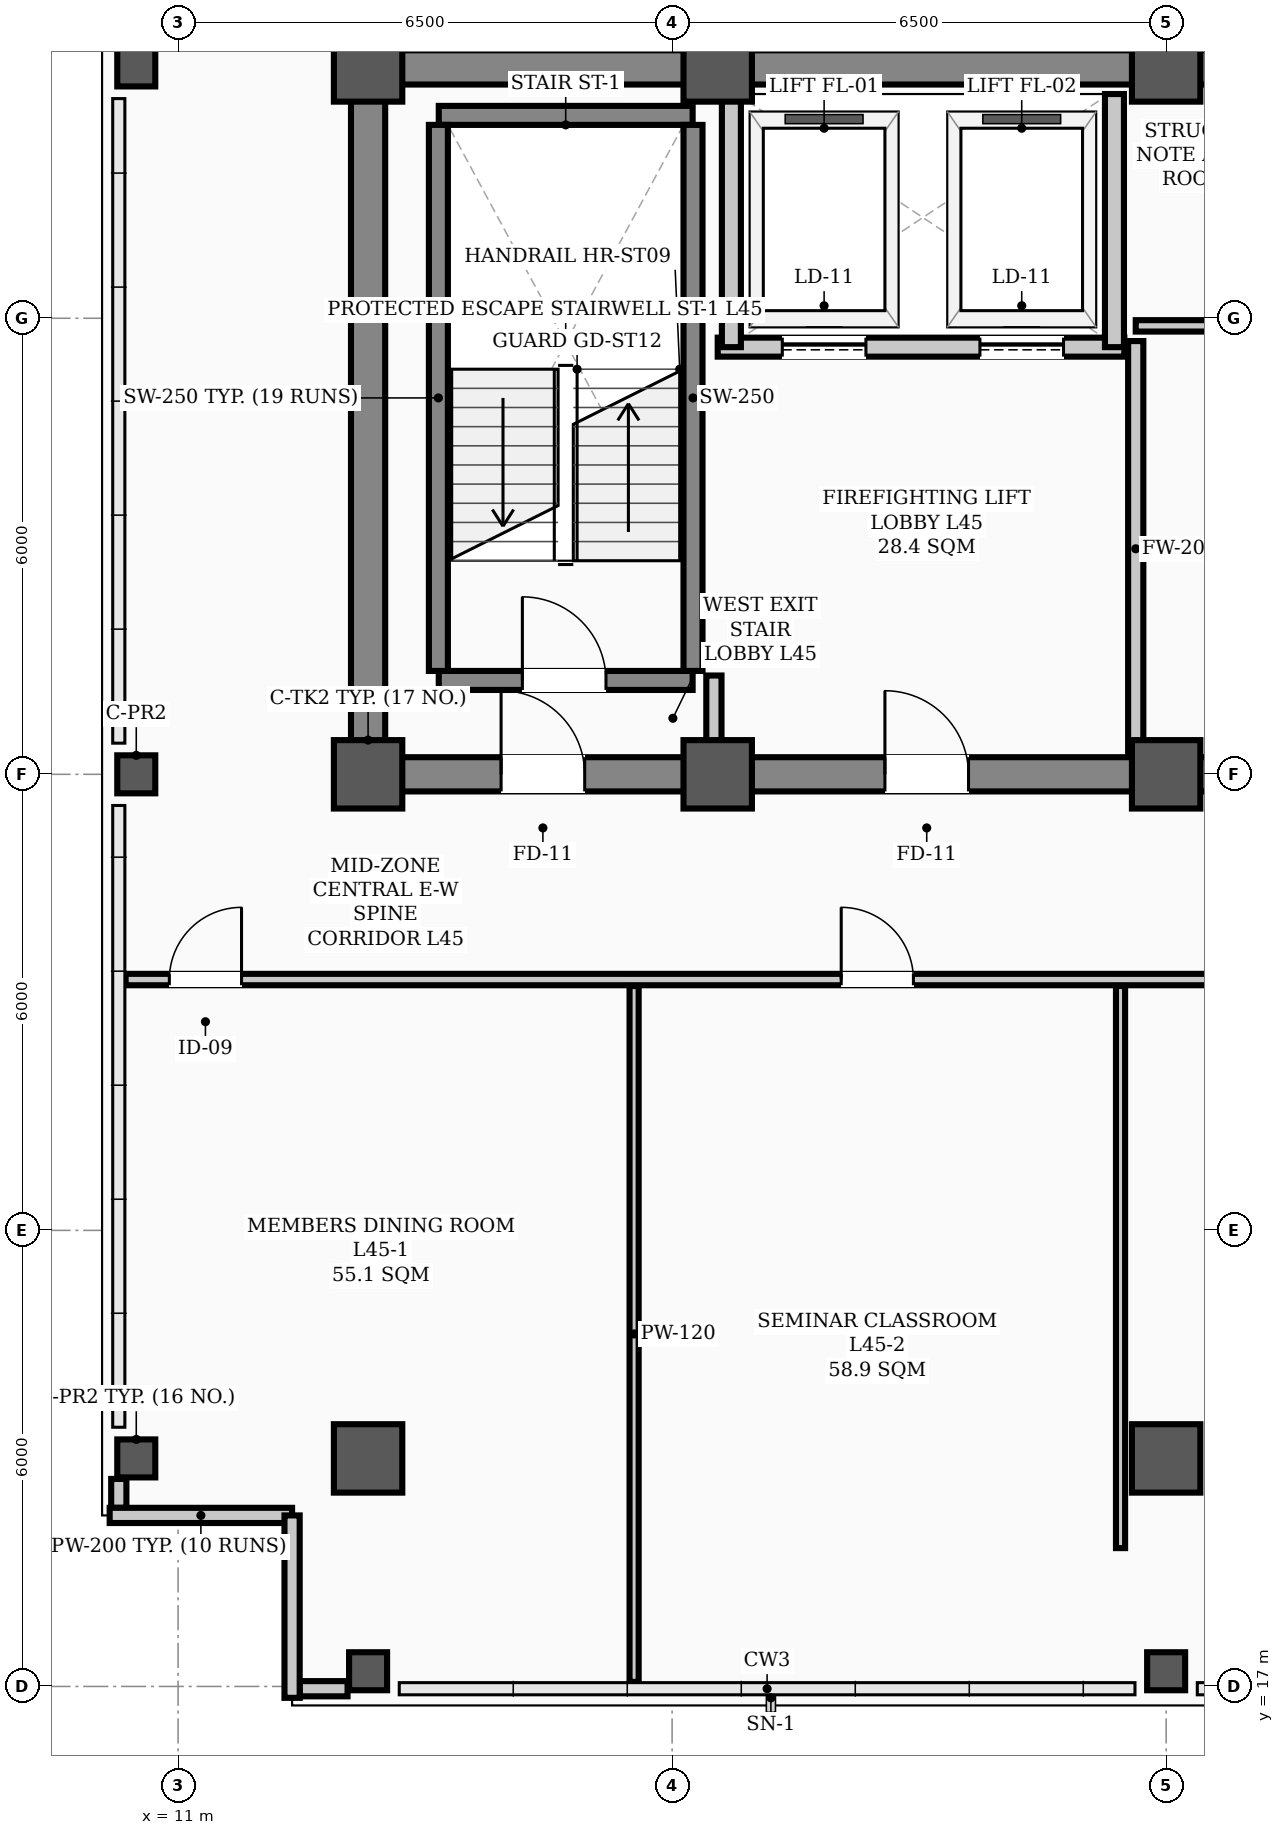
"""IFC4 building model, lengths in metres.
Left out: names, types, materials, properties, quantities, classifications, styles, units other than length and angle.
Written with IfcOpenShell. Run it as: python <this file> out.ifc"""

import sys

from ifc_helpers import new_model, si_unit, direction, frame, frame_2d, origin, origin_2d, place, context, subcontext, project, spatial, rectangle, hollow_rectangle, extrude, element, fill, save


model = new_model("IFC4")
c1 = context("Model", 3, precision=1e-05, world=origin(), true_north=direction((0.0, 1.0)))
c2 = subcontext(c1, "Body", "Model", "MODEL_VIEW")
j1 = project(units=[si_unit("LENGTHUNIT", "METRE"), si_unit("PLANEANGLEUNIT", "RADIAN")], contexts=[c1])
p1 = place(None, origin())
s1 = spatial("IfcSite", under=j1, at=p1, CompositionType="ELEMENT")
p2 = place(p1, origin())
s2 = spatial("IfcBuilding", under=s1, at=p2, CompositionType="ELEMENT")
p3 = place(p2, frame((0.0, 0.0, 181.2)))
s3 = spatial("IfcBuildingStorey", under=s2, at=p3, CompositionType="ELEMENT", Elevation=181.2)
for number, where, z_axis, x_axis in (
    (1, (13.5, 29.0, 0.0), (0.0, 0.0, 1.0), (1.0, 0.0, 0.0)),
    (2, (13.5, 38.3, 0.0), (0.0, 0.0, 1.0), (1.0, 0.0, 0.0)),
    (3, (18.1, 29.0, 0.0), (0.0, 0.0, 1.0), (1.0, 0.0, 0.0)),
    (4, (18.1, 38.3, 0.0), (0.0, 0.0, 1.0), (1.0, 0.0, 0.0)),
    (5, (24.0, 29.0, 0.0), (0.0, 0.0, 1.0), (1.0, 0.0, 0.0)),
    (6, (24.0, 38.3, 0.0), (0.0, 0.0, 1.0), (1.0, 0.0, 0.0)),
    (7, (13.5, 20.0, 0.0), (0.0, 0.0, 1.0), (1.0, 0.0, 0.0)),
    (8, (24.0, 20.0, 0.0), (0.0, 0.0, 1.0), (1.0, 0.0, 0.0)),
):
    element("IfcColumn", number, at=place(p3, frame(where, z_axis=z_axis, x_axis=x_axis)), inside=s3, PredefinedType="COLUMN", context=c2, shape_type="SweptSolid", body=[
        extrude(hollow_rectangle(XDim=0.9, YDim=0.9, WallThickness=0.035, InnerFilletRadius=0.017, OuterFilletRadius=0.052, at=origin_2d()), origin(), (0.0, 0.0, 1.0), 3.9),
    ])
for number, where, z_axis, x_axis in (
    (9, (10.45, 20.0, 0.0), (0.0, 0.0, 1.0), (1.0, 0.0, 0.0)),
    (10, (10.45, 29.0, 0.0), (0.0, 0.0, 1.0), (1.0, 0.0, 0.0)),
    (11, (10.45, 38.3, 0.0), (0.0, 0.0, 1.0), (1.0, 0.0, 0.0)),
    (12, (13.5, 17.2, 0.0), (0.0, 0.0, 1.0), (1.0, 0.0, 0.0)),
    (13, (24.0, 17.2, 0.0), (0.0, 0.0, 1.0), (1.0, 0.0, 0.0)),
):
    element("IfcColumn", number, at=place(p3, frame(where, z_axis=z_axis, x_axis=x_axis)), inside=s3, PredefinedType="COLUMN", context=c2, shape_type="SweptSolid", body=[
        extrude(hollow_rectangle(XDim=0.5, YDim=0.5, WallThickness=0.024, InnerFilletRadius=0.012, OuterFilletRadius=0.036, at=origin_2d()), origin(), (0.0, 0.0, 1.0), 3.9),
    ])
p4 = place(p3, frame((10.22, 19.35, 0.0), z_axis=(0.0, 0.0, 1.0), x_axis=(0.0, 1.0, 0.0)))
e14 = element("IfcWall", 14, at=p4, inside=s3, PredefinedType="PARAPET", context=c2, shape_type="SweptSolid", body=[
    extrude(rectangle(XDim=0.38, YDim=0.2, at=frame_2d((0.19, 0.0))), origin(), (0.0, 0.0, 1.0), 1.2),
])
p5 = place(p3, frame((12.6, 16.97, 0.0), z_axis=(0.0, 0.0, 1.0), x_axis=(1.0, 0.0, 0.0)))
e15 = element("IfcWall", 15, at=p5, inside=s3, PredefinedType="PARAPET", context=c2, shape_type="SweptSolid", body=[
    extrude(rectangle(XDim=0.63, YDim=0.2, at=frame_2d((0.315, 0.0))), origin(), (0.0, 0.0, 1.0), 1.2),
])
for number, where, z_axis, x_axis in (
    (16, (10.1, 19.25, 0.0), (0.0, 0.0, 1.0), (1.0, 0.0, 0.0)),
    (17, (12.5, 19.25, 0.0), (0.0, 0.0, 1.0), (0.0, -1.0, 0.0)),
):
    element("IfcWall", number, at=place(p3, frame(where, z_axis=z_axis, x_axis=x_axis)), inside=s3, PredefinedType="PARAPET", context=c2, shape_type="SweptSolid", body=[
        extrude(rectangle(XDim=2.4, YDim=0.2, at=frame_2d((1.2, 0.0))), origin(), (0.0, 0.0, 1.0), 1.2),
    ])
p6 = place(p3, frame((13.5, 29.0, 0.0), z_axis=(0.0, 0.0, 1.0), x_axis=(1.0, 0.0, 0.0)))
e18 = element("IfcWall", 18, at=p6, inside=s3, PredefinedType="SHEAR", context=c2, shape_type="SweptSolid", body=[
    extrude(rectangle(XDim=30.5, YDim=0.45, at=frame_2d((15.25, 0.0))), origin(), (0.0, 0.0, 1.0), 3.72),
])
p7 = place(p6, frame((1.75, 0.0, 0.0)))
e19 = element("IfcOpeningElement", 19, at=p7, cuts=e18, PredefinedType="OPENING", context=c2, shape_type="SweptSolid", body=[
    extrude(rectangle(XDim=1.1, YDim=2.08, at=frame_2d((0.55, 1.04))), frame((0.0, 0.235, 0.0), z_axis=(0.0, -1.0, 0.0), x_axis=(1.0, 0.0, 0.0)), (0.0, 0.0, 1.0), 0.47),
])
p8 = place(p6, frame((26.7, 0.0, 0.0)))
e20 = element("IfcOpeningElement", 20, at=p8, cuts=e18, PredefinedType="OPENING", context=c2, shape_type="SweptSolid", body=[
    extrude(rectangle(XDim=1.1, YDim=2.08, at=frame_2d((0.55, 1.04))), frame((0.0, 0.235, 0.0), z_axis=(0.0, -1.0, 0.0), x_axis=(1.0, 0.0, 0.0)), (0.0, 0.0, 1.0), 0.47),
])
p9 = place(p6, frame((6.8, 0.0, 0.0)))
e21 = element("IfcOpeningElement", 21, at=p9, cuts=e18, PredefinedType="OPENING", context=c2, shape_type="SweptSolid", body=[
    extrude(rectangle(XDim=1.1, YDim=2.08, at=frame_2d((0.55, 1.04))), frame((0.0, 0.235, 0.0), z_axis=(0.0, -1.0, 0.0), x_axis=(1.0, 0.0, 0.0)), (0.0, 0.0, 1.0), 0.47),
])
p10 = place(p6, frame((13.2, 0.0, 0.0)))
e22 = element("IfcOpeningElement", 22, at=p10, cuts=e18, PredefinedType="OPENING", context=c2, shape_type="SweptSolid", body=[
    extrude(rectangle(XDim=1.6, YDim=2.08, at=frame_2d((0.8, 1.04))), frame((0.0, 0.235, 0.0), z_axis=(0.0, -1.0, 0.0), x_axis=(1.0, 0.0, 0.0)), (0.0, 0.0, 1.0), 0.47),
])
p11 = place(p6, frame((19.5, 0.0, 0.0)))
e23 = element("IfcOpeningElement", 23, at=p11, cuts=e18, PredefinedType="OPENING", context=c2, shape_type="SweptSolid", body=[
    extrude(rectangle(XDim=0.9, YDim=2.08, at=frame_2d((0.45, 1.04))), frame((0.0, 0.235, 0.0), z_axis=(0.0, -1.0, 0.0), x_axis=(1.0, 0.0, 0.0)), (0.0, 0.0, 1.0), 0.47),
])
p12 = place(p6, frame((21.55, 0.0, 0.0)))
e24 = element("IfcOpeningElement", 24, at=p12, cuts=e18, PredefinedType="OPENING", context=c2, shape_type="SweptSolid", body=[
    extrude(rectangle(XDim=0.9, YDim=2.08, at=frame_2d((0.45, 1.04))), frame((0.0, 0.235, 0.0), z_axis=(0.0, -1.0, 0.0), x_axis=(1.0, 0.0, 0.0)), (0.0, 0.0, 1.0), 0.47),
])
p13 = place(p3, frame((13.5, 38.3, 0.0), z_axis=(0.0, 0.0, 1.0), x_axis=(1.0, 0.0, 0.0)))
e25 = element("IfcWall", 25, at=p13, inside=s3, PredefinedType="SHEAR", context=c2, shape_type="SweptSolid", body=[
    extrude(rectangle(XDim=30.5, YDim=0.45, at=frame_2d((15.25, 0.0))), origin(), (0.0, 0.0, 1.0), 3.72),
])
p14 = place(p3, frame((13.5, 29.35, 0.0), z_axis=(0.0, 0.0, 1.0), x_axis=(0.0, 1.0, 0.0)))
e26 = element("IfcWall", 26, at=p14, inside=s3, PredefinedType="SHEAR", context=c2, shape_type="SweptSolid", body=[
    extrude(rectangle(XDim=8.6, YDim=0.45, at=frame_2d((4.3, 0.0))), origin(), (0.0, 0.0, 1.0), 3.72),
])
p15 = place(p3, frame((14.43, 30.235, 0.0), z_axis=(0.0, 0.0, 1.0), x_axis=(1.0, 0.0, 0.0)))
e27 = element("IfcWall", 27, at=p15, inside=s3, PredefinedType="STANDARD", context=c2, shape_type="SweptSolid", body=[
    extrude(rectangle(XDim=3.34, YDim=0.25, at=frame_2d((1.67, 0.0))), origin(), (0.0, 0.0, 1.0), 3.72),
])
p16 = place(p15, frame((1.1, 0.0, 0.0)))
e28 = element("IfcOpeningElement", 28, at=p16, cuts=e27, PredefinedType="OPENING", context=c2, shape_type="SweptSolid", body=[
    extrude(rectangle(XDim=1.1, YDim=2.08, at=frame_2d((0.55, 1.04))), frame((0.0, 0.135, 0.0), z_axis=(0.0, -1.0, 0.0), x_axis=(1.0, 0.0, 0.0)), (0.0, 0.0, 1.0), 0.27),
])
p17 = place(p3, frame((14.43, 37.669, 0.0), z_axis=(0.0, 0.0, 1.0), x_axis=(1.0, 0.0, 0.0)))
e29 = element("IfcWall", 29, at=p17, inside=s3, PredefinedType="STANDARD", context=c2, shape_type="SweptSolid", body=[
    extrude(rectangle(XDim=3.34, YDim=0.25, at=frame_2d((1.67, 0.0))), origin(), (0.0, 0.0, 1.0), 3.72),
])
for number, where, z_axis, x_axis in (
    (30, (14.425, 30.36, 0.0), (0.0, 0.0, 1.0), (0.0, 1.0, 0.0)),
    (31, (17.775, 30.36, 0.0), (0.0, 0.0, 1.0), (0.0, 1.0, 0.0)),
):
    element("IfcWall", number, at=place(p3, frame(where, z_axis=z_axis, x_axis=x_axis)), inside=s3, PredefinedType="STANDARD", context=c2, shape_type="SweptSolid", body=[
        extrude(rectangle(XDim=7.184, YDim=0.25, at=frame_2d((3.592, 0.0))), origin(), (0.0, 0.0, 1.0), 3.72),
    ])
p18 = place(p3, frame((18.1, 34.62, 0.0), z_axis=(0.0, 0.0, 1.0), x_axis=(1.0, 0.0, 0.0)))
e32 = element("IfcWall", 32, at=p18, inside=s3, PredefinedType="STANDARD", context=c2, shape_type="SweptSolid", body=[
    extrude(rectangle(XDim=5.35, YDim=0.25, at=frame_2d((2.675, 0.0))), origin(), (0.0, 0.0, 1.0), 3.72),
])
p19 = place(p18, frame((0.85, 0.0, 0.0)))
e33 = element("IfcOpeningElement", 33, at=p19, cuts=e32, PredefinedType="OPENING", context=c2, shape_type="SweptSolid", body=[
    extrude(rectangle(XDim=1.1, YDim=2.08, at=frame_2d((0.55, 1.04))), frame((0.0, 0.135, 0.0), z_axis=(0.0, -1.0, 0.0), x_axis=(1.0, 0.0, 0.0)), (0.0, 0.0, 1.0), 0.27),
])
p20 = place(p18, frame((3.45, 0.0, 0.0)))
e34 = element("IfcOpeningElement", 34, at=p20, cuts=e32, PredefinedType="OPENING", context=c2, shape_type="SweptSolid", body=[
    extrude(rectangle(XDim=1.1, YDim=2.08, at=frame_2d((0.55, 1.04))), frame((0.0, 0.135, 0.0), z_axis=(0.0, -1.0, 0.0), x_axis=(1.0, 0.0, 0.0)), (0.0, 0.0, 1.0), 0.27),
])
for number, where, z_axis, x_axis in (
    (35, (18.28, 34.62, 0.0), (0.0, 0.0, 1.0), (0.0, 1.0, 0.0)),
    (36, (23.32, 34.62, 0.0), (0.0, 0.0, 1.0), (0.0, 1.0, 0.0)),
):
    element("IfcWall", number, at=place(p3, frame(where, z_axis=z_axis, x_axis=x_axis)), inside=s3, PredefinedType="STANDARD", context=c2, shape_type="SweptSolid", body=[
        extrude(rectangle(XDim=3.33, YDim=0.25, at=frame_2d((1.665, 0.0))), origin(), (0.0, 0.0, 1.0), 3.35),
    ])
p21 = place(p3, frame((23.6, 34.9, 0.0), z_axis=(0.0, 0.0, 1.0), x_axis=(1.0, 0.0, 0.0)))
e37 = element("IfcWall", 37, at=p21, inside=s3, PredefinedType="PARTITIONING", context=c2, shape_type="SweptSolid", body=[
    extrude(rectangle(XDim=4.58, YDim=0.15, at=frame_2d((2.29, 0.0))), origin(), (0.0, 0.0, 1.0), 3.72),
])
p22 = place(p21, frame((1.875, 0.0, 0.0)))
e38 = element("IfcOpeningElement", 38, at=p22, cuts=e37, PredefinedType="OPENING", context=c2, shape_type="SweptSolid", body=[
    extrude(rectangle(XDim=0.95, YDim=2.08, at=frame_2d((0.475, 1.04))), frame((0.0, 0.085, 0.0), z_axis=(0.0, -1.0, 0.0), x_axis=(1.0, 0.0, 0.0)), (0.0, 0.0, 1.0), 0.17),
])
p23 = place(p3, frame((10.31, 26.3, 0.0), z_axis=(0.0, 0.0, 1.0), x_axis=(1.0, 0.0, 0.0)))
e39 = element("IfcWall", 39, at=p23, inside=s3, PredefinedType="PARTITIONING", context=c2, shape_type="SweptSolid", body=[
    extrude(rectangle(XDim=43.38, YDim=0.15, at=frame_2d((21.69, 0.0))), origin(), (0.0, 0.0, 1.0), 3.2),
])
p24 = place(p23, frame((0.575, 0.0, 0.0)))
e40 = element("IfcOpeningElement", 40, at=p24, cuts=e39, PredefinedType="OPENING", context=c2, shape_type="SweptSolid", body=[
    extrude(rectangle(XDim=0.95, YDim=2.08, at=frame_2d((0.475, 1.04))), frame((0.0, 0.085, 0.0), z_axis=(0.0, -1.0, 0.0), x_axis=(1.0, 0.0, 0.0)), (0.0, 0.0, 1.0), 0.17),
])
p25 = place(p23, frame((9.415, 0.0, 0.0)))
e41 = element("IfcOpeningElement", 41, at=p25, cuts=e39, PredefinedType="OPENING", context=c2, shape_type="SweptSolid", body=[
    extrude(rectangle(XDim=0.95, YDim=2.08, at=frame_2d((0.475, 1.04))), frame((0.0, 0.085, 0.0), z_axis=(0.0, -1.0, 0.0), x_axis=(1.0, 0.0, 0.0)), (0.0, 0.0, 1.0), 0.17),
])
p26 = place(p23, frame((16.115, 0.0, 0.0)))
e42 = element("IfcOpeningElement", 42, at=p26, cuts=e39, PredefinedType="OPENING", context=c2, shape_type="SweptSolid", body=[
    extrude(rectangle(XDim=0.95, YDim=2.08, at=frame_2d((0.475, 1.04))), frame((0.0, 0.085, 0.0), z_axis=(0.0, -1.0, 0.0), x_axis=(1.0, 0.0, 0.0)), (0.0, 0.0, 1.0), 0.17),
])
p27 = place(p23, frame((22.715, 0.0, 0.0)))
e43 = element("IfcOpeningElement", 43, at=p27, cuts=e39, PredefinedType="OPENING", context=c2, shape_type="SweptSolid", body=[
    extrude(rectangle(XDim=0.95, YDim=2.08, at=frame_2d((0.475, 1.04))), frame((0.0, 0.085, 0.0), z_axis=(0.0, -1.0, 0.0), x_axis=(1.0, 0.0, 0.0)), (0.0, 0.0, 1.0), 0.17),
])
p28 = place(p23, frame((29.015, 0.0, 0.0)))
e44 = element("IfcOpeningElement", 44, at=p28, cuts=e39, PredefinedType="OPENING", context=c2, shape_type="SweptSolid", body=[
    extrude(rectangle(XDim=0.95, YDim=2.08, at=frame_2d((0.475, 1.04))), frame((0.0, 0.085, 0.0), z_axis=(0.0, -1.0, 0.0), x_axis=(1.0, 0.0, 0.0)), (0.0, 0.0, 1.0), 0.17),
])
p29 = place(p23, frame((34.79, 0.0, 0.0)))
e45 = element("IfcOpeningElement", 45, at=p29, cuts=e39, PredefinedType="OPENING", context=c2, shape_type="SweptSolid", body=[
    extrude(rectangle(XDim=0.95, YDim=2.08, at=frame_2d((0.475, 1.04))), frame((0.0, 0.085, 0.0), z_axis=(0.0, -1.0, 0.0), x_axis=(1.0, 0.0, 0.0)), (0.0, 0.0, 1.0), 0.17),
])
p30 = place(p3, frame((18.05, 29.235, 0.0), z_axis=(0.0, 0.0, 1.0), x_axis=(0.0, 1.0, 0.0)))
e46 = element("IfcWall", 46, at=p30, inside=s3, PredefinedType="STANDARD", context=c2, shape_type="SweptSolid", body=[
    extrude(rectangle(XDim=1.065, YDim=0.2, at=frame_2d((0.532, 0.0))), origin(), (0.0, 0.0, 1.0), 3.35),
])
p31 = place(p3, frame((23.6, 29.235, 0.0), z_axis=(0.0, 0.0, 1.0), x_axis=(0.0, 1.0, 0.0)))
e47 = element("IfcWall", 47, at=p31, inside=s3, PredefinedType="STANDARD", context=c2, shape_type="SweptSolid", body=[
    extrude(rectangle(XDim=5.465, YDim=0.2, at=frame_2d((2.732, 0.0))), origin(), (0.0, 0.0, 1.0), 3.2),
])
p32 = place(p3, frame((17.0, 17.06, 0.0), z_axis=(0.0, 0.0, 1.0), x_axis=(0.0, 1.0, 0.0)))
e48 = element("IfcWall", 48, at=p32, inside=s3, PredefinedType="PARTITIONING", context=c2, shape_type="SweptSolid", body=[
    extrude(rectangle(XDim=9.155, YDim=0.12, at=frame_2d((4.578, 0.0))), origin(), (0.0, 0.0, 1.0), 3.1),
])
p33 = place(p3, frame((23.4, 18.82, 0.0), z_axis=(0.0, 0.0, 1.0), x_axis=(0.0, 1.0, 0.0)))
e49 = element("IfcWall", 49, at=p33, inside=s3, PredefinedType="PARTITIONING", context=c2, shape_type="SweptSolid", body=[
    extrude(rectangle(XDim=7.395, YDim=0.12, at=frame_2d((3.698, 0.0))), origin(), (0.0, 0.0, 1.0), 3.1),
])
p34 = place(p16, origin())
e50 = element("IfcDoor", 50, at=p34, inside=s3, OperationType="SINGLE_SWING_LEFT", PredefinedType="DOOR", context=c2, shape_type="SweptSolid", body=[
    extrude(rectangle(XDim=1.1, YDim=2.08, at=frame_2d((0.55, 1.04))), frame((0.0, 0.025, 0.0), z_axis=(0.0, -1.0, 0.0), x_axis=(1.0, 0.0, 0.0)), (0.0, 0.0, 1.0), 0.05),
])
fill(e28, e50)
p35 = place(p7, origin())
e51 = element("IfcDoor", 51, at=p35, inside=s3, OperationType="SINGLE_SWING_LEFT", PredefinedType="DOOR", context=c2, shape_type="SweptSolid", body=[
    extrude(rectangle(XDim=1.1, YDim=2.08, at=frame_2d((0.55, 1.04))), frame((0.0, 0.025, 0.0), z_axis=(0.0, -1.0, 0.0), x_axis=(1.0, 0.0, 0.0)), (0.0, 0.0, 1.0), 0.05),
])
fill(e19, e51)
p36 = place(p9, origin())
e52 = element("IfcDoor", 52, at=p36, inside=s3, OperationType="SINGLE_SWING_LEFT", PredefinedType="DOOR", context=c2, shape_type="SweptSolid", body=[
    extrude(rectangle(XDim=1.1, YDim=2.08, at=frame_2d((0.55, 1.04))), frame((0.0, 0.025, 0.0), z_axis=(0.0, -1.0, 0.0), x_axis=(1.0, 0.0, 0.0)), (0.0, 0.0, 1.0), 0.05),
])
fill(e21, e52)
p37 = place(p24, origin())
e53 = element("IfcDoor", 53, at=p37, inside=s3, OperationType="SINGLE_SWING_RIGHT", PredefinedType="DOOR", context=c2, shape_type="SweptSolid", body=[
    extrude(rectangle(XDim=0.95, YDim=2.08, at=frame_2d((0.475, 1.04))), frame((0.0, 0.025, 0.0), z_axis=(0.0, -1.0, 0.0), x_axis=(1.0, 0.0, 0.0)), (0.0, 0.0, 1.0), 0.05),
])
fill(e40, e53)
p38 = place(p25, origin())
e54 = element("IfcDoor", 54, at=p38, inside=s3, OperationType="SINGLE_SWING_LEFT", PredefinedType="DOOR", context=c2, shape_type="SweptSolid", body=[
    extrude(rectangle(XDim=0.95, YDim=2.08, at=frame_2d((0.475, 1.04))), frame((0.0, 0.025, 0.0), z_axis=(0.0, -1.0, 0.0), x_axis=(1.0, 0.0, 0.0)), (0.0, 0.0, 1.0), 0.05),
])
fill(e41, e54)
p39 = place(p19, origin())
e55 = element("IfcDoor", 55, at=p39, inside=s3, OperationType="SLIDING_TO_LEFT", PredefinedType="DOOR", context=c2, shape_type="SweptSolid", body=[
    extrude(rectangle(XDim=1.1, YDim=2.08, at=frame_2d((0.55, 1.04))), frame((0.0, 0.025, 0.0), z_axis=(0.0, -1.0, 0.0), x_axis=(1.0, 0.0, 0.0)), (0.0, 0.0, 1.0), 0.05),
])
fill(e33, e55)
p40 = place(p20, origin())
e56 = element("IfcDoor", 56, at=p40, inside=s3, OperationType="SLIDING_TO_LEFT", PredefinedType="DOOR", context=c2, shape_type="SweptSolid", body=[
    extrude(rectangle(XDim=1.1, YDim=2.08, at=frame_2d((0.55, 1.04))), frame((0.0, 0.025, 0.0), z_axis=(0.0, -1.0, 0.0), x_axis=(1.0, 0.0, 0.0)), (0.0, 0.0, 1.0), 0.05),
])
fill(e34, e56)
save(model, sys.argv[1])
